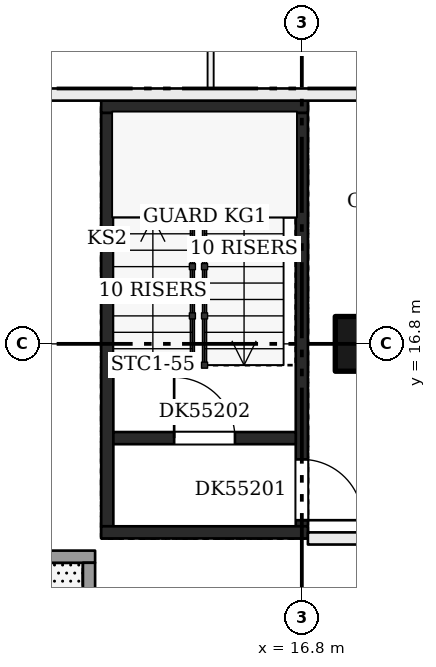
"""IFC4 building model, lengths in metres.
Left out: names, types, materials, properties, quantities, classifications, styles, units other than length and angle.
Written with IfcOpenShell. Run it as: python <this file> out.ifc"""

import sys

from ifc_helpers import new_model, si_unit, direction, frame, frame_2d, origin, origin_2d, place, context, subcontext, project, spatial, rectangle, extrude, element, fill, save


model = new_model("IFC4")
c1 = context("Model", 3, precision=1e-05, world=origin(), true_north=direction((0.0, 1.0)))
c2 = subcontext(c1, "Body", "Model", "MODEL_VIEW")
j1 = project(units=[si_unit("LENGTHUNIT", "METRE"), si_unit("PLANEANGLEUNIT", "RADIAN")], contexts=[c1])
p1 = place(None, origin())
s1 = spatial("IfcSite", under=j1, at=p1, CompositionType="ELEMENT")
p2 = place(p1, origin())
s2 = spatial("IfcBuilding", under=s1, at=p2, CompositionType="ELEMENT")
p3 = place(p2, frame((0.0, 0.0, 214.2)))
s3 = spatial("IfcBuildingStorey", under=s2, at=p3, CompositionType="ELEMENT", Elevation=214.2)
p4 = place(p3, frame((17.8, 16.8, 0.0), z_axis=(0.0, 0.0, 1.0), x_axis=(1.0, 0.0, 0.0)))
e1 = element("IfcColumn", 1, at=p4, inside=s3, PredefinedType="COLUMN", context=c2, shape_type="SweptSolid", body=[
    extrude(rectangle(XDim=0.9, YDim=0.9, at=origin_2d()), origin(), (0.0, 0.0, 1.0), 3.22),
])
p5 = place(p3, frame((13.6, 13.8, 0.0), z_axis=(0.0, 0.0, 1.0), x_axis=(0.0, 1.0, 0.0)))
e2 = element("IfcWall", 2, at=p5, inside=s3, PredefinedType="SHEAR", context=c2, shape_type="SweptSolid", body=[
    extrude(rectangle(XDim=6.8, YDim=0.2, at=frame_2d((3.4, 0.0))), origin(), (0.0, 0.0, 1.0), 3.22),
])
p6 = place(p3, frame((16.8, 13.8, 0.0), z_axis=(0.0, 0.0, 1.0), x_axis=(0.0, 1.0, 0.0)))
e3 = element("IfcWall", 3, at=p6, inside=s3, PredefinedType="SHEAR", context=c2, shape_type="SweptSolid", body=[
    extrude(rectangle(XDim=6.8, YDim=0.2, at=frame_2d((3.4, 0.0))), origin(), (0.0, 0.0, 1.0), 3.22),
])
p7 = place(p6, frame((0.1, 0.0, 0.0)))
e4 = element("IfcOpeningElement", 4, at=p7, cuts=e3, PredefinedType="OPENING", context=c2, shape_type="SweptSolid", body=[
    extrude(rectangle(XDim=1.0, YDim=2.1, at=frame_2d((0.5, 1.05))), frame((0.0, 0.11, 0.0), z_axis=(0.0, -1.0, 0.0), x_axis=(1.0, 0.0, 0.0)), (0.0, 0.0, 1.0), 0.22),
])
for number, where, z_axis, x_axis in (
    (5, (13.5, 13.7, 0.0), (0.0, 0.0, 1.0), (1.0, 0.0, 0.0)),
    (6, (13.5, 20.7, 0.0), (0.0, 0.0, 1.0), (1.0, 0.0, 0.0)),
):
    element("IfcWall", number, at=place(p3, frame(where, z_axis=z_axis, x_axis=x_axis)), inside=s3, PredefinedType="SHEAR", context=c2, shape_type="SweptSolid", body=[
        extrude(rectangle(XDim=3.4, YDim=0.2, at=frame_2d((1.7, 0.0))), origin(), (0.0, 0.0, 1.0), 3.22),
    ])
p8 = place(p3, frame((13.7, 15.25, 0.0), z_axis=(0.0, 0.0, 1.0), x_axis=(1.0, 0.0, 0.0)))
e7 = element("IfcWall", 7, at=p8, inside=s3, PredefinedType="SHEAR", context=c2, shape_type="SweptSolid", body=[
    extrude(rectangle(XDim=3.0, YDim=0.2, at=frame_2d((1.5, 0.0))), origin(), (0.0, 0.0, 1.0), 3.22),
])
p9 = place(p8, frame((1.0, 0.0, 0.0)))
e8 = element("IfcOpeningElement", 8, at=p9, cuts=e7, PredefinedType="OPENING", context=c2, shape_type="SweptSolid", body=[
    extrude(rectangle(XDim=1.0, YDim=2.1, at=frame_2d((0.5, 1.05))), frame((0.0, 0.11, 0.0), z_axis=(0.0, -1.0, 0.0), x_axis=(1.0, 0.0, 0.0)), (0.0, 0.0, 1.0), 0.22),
])
p10 = place(p3, frame((16.9, 13.6, 0.0), z_axis=(0.0, 0.0, 1.0), x_axis=(1.0, 0.0, 0.0)))
e9 = element("IfcWall", 9, at=p10, inside=s3, PredefinedType="PARTITIONING", context=c2, shape_type="SweptSolid", body=[
    extrude(rectangle(XDim=4.2, YDim=0.2, at=frame_2d((2.1, 0.0))), origin(), (0.0, 0.0, 1.0), 3.22),
])
p11 = place(p10, frame((1.6, 0.0, 0.0)))
e10 = element("IfcOpeningElement", 10, at=p11, cuts=e9, PredefinedType="OPENING", context=c2, shape_type="SweptSolid", body=[
    extrude(rectangle(XDim=1.0, YDim=2.1, at=frame_2d((0.5, 1.05))), frame((0.0, 0.11, 0.0), z_axis=(0.0, -1.0, 0.0), x_axis=(1.0, 0.0, 0.0)), (0.0, 0.0, 1.0), 0.22),
])
p12 = place(p3, frame((10.9, 20.9, 0.0), z_axis=(0.0, 0.0, 1.0), x_axis=(1.0, 0.0, 0.0)))
e11 = element("IfcWall", 11, at=p12, inside=s3, PredefinedType="PARTITIONING", context=c2, shape_type="SweptSolid", body=[
    extrude(rectangle(XDim=8.3, YDim=0.2, at=frame_2d((4.15, 0.0))), origin(), (0.0, 0.0, 1.0), 3.22),
])
p13 = place(p3, frame((15.3, 21.0, 0.0), z_axis=(0.0, 0.0, 1.0), x_axis=(0.0, 1.0, 0.0)))
e12 = element("IfcWall", 12, at=p13, inside=s3, PredefinedType="PARTITIONING", context=c2, shape_type="SweptSolid", body=[
    extrude(rectangle(XDim=19.0, YDim=0.1, at=frame_2d((9.5, 0.0))), origin(), (0.0, 0.0, 1.0), 3.22),
])
p14 = place(p13, frame((1.6, 0.0, 0.0)))
e13 = element("IfcOpeningElement", 13, at=p14, cuts=e12, PredefinedType="OPENING", context=c2, shape_type="SweptSolid", body=[
    extrude(rectangle(XDim=0.9, YDim=2.1, at=frame_2d((0.45, 1.05))), frame((0.0, 0.06, 0.0), z_axis=(0.0, -1.0, 0.0), x_axis=(1.0, 0.0, 0.0)), (0.0, 0.0, 1.0), 0.12),
])
p15 = place(p13, frame((5.8, 0.0, 0.0)))
e14 = element("IfcOpeningElement", 14, at=p15, cuts=e12, PredefinedType="OPENING", context=c2, shape_type="SweptSolid", body=[
    extrude(rectangle(XDim=0.9, YDim=2.1, at=frame_2d((0.45, 1.05))), frame((0.0, 0.06, 0.0), z_axis=(0.0, -1.0, 0.0), x_axis=(1.0, 0.0, 0.0)), (0.0, 0.0, 1.0), 0.12),
])
p16 = place(p13, frame((10.0, 0.0, 0.0)))
e15 = element("IfcOpeningElement", 15, at=p16, cuts=e12, PredefinedType="OPENING", context=c2, shape_type="SweptSolid", body=[
    extrude(rectangle(XDim=0.9, YDim=2.1, at=frame_2d((0.45, 1.05))), frame((0.0, 0.06, 0.0), z_axis=(0.0, -1.0, 0.0), x_axis=(1.0, 0.0, 0.0)), (0.0, 0.0, 1.0), 0.12),
])
p17 = place(p13, frame((15.4, 0.0, 0.0)))
e16 = element("IfcOpeningElement", 16, at=p17, cuts=e12, PredefinedType="OPENING", context=c2, shape_type="SweptSolid", body=[
    extrude(rectangle(XDim=0.9, YDim=2.1, at=frame_2d((0.45, 1.05))), frame((0.0, 0.06, 0.0), z_axis=(0.0, -1.0, 0.0), x_axis=(1.0, 0.0, 0.0)), (0.0, 0.0, 1.0), 0.12),
])
p18 = place(p3, frame((10.8, 13.3, 0.0), z_axis=(0.0, 0.0, 1.0), x_axis=(1.0, 0.0, 0.0)))
e17 = element("IfcWall", 17, at=p18, inside=s3, PredefinedType="SOLIDWALL", context=c2, shape_type="SweptSolid", body=[
    extrude(rectangle(XDim=2.6, YDim=0.2, at=frame_2d((1.3, 0.0))), origin(), (0.0, 0.0, 1.0), 3.22),
])
p19 = place(p3, frame((13.3, 13.2, 0.0), z_axis=(0.0, 0.0, 1.0), x_axis=(0.0, -1.0, 0.0)))
e18 = element("IfcWall", 18, at=p19, inside=s3, PredefinedType="SOLIDWALL", context=c2, shape_type="SweptSolid", body=[
    extrude(rectangle(XDim=2.2, YDim=0.2, at=frame_2d((1.1, 0.0))), origin(), (0.0, 0.0, 1.0), 3.22),
])
p20 = place(p7, frame((1.0, 0.0, 0.0), z_axis=(0.0, 0.0, 1.0), x_axis=(-1.0, 0.0, 0.0)))
e19 = element("IfcDoor", 19, at=p20, inside=s3, OperationType="SINGLE_SWING_RIGHT", PredefinedType="DOOR", context=c2, shape_type="SweptSolid", body=[
    extrude(rectangle(XDim=1.0, YDim=2.1, at=frame_2d((0.5, 1.05))), frame((0.0, 0.025, 0.0), z_axis=(0.0, -1.0, 0.0), x_axis=(1.0, 0.0, 0.0)), (0.0, 0.0, 1.0), 0.05),
])
fill(e4, e19)
p21 = place(p9, origin())
e20 = element("IfcDoor", 20, at=p21, inside=s3, OperationType="SINGLE_SWING_LEFT", PredefinedType="DOOR", context=c2, shape_type="SweptSolid", body=[
    extrude(rectangle(XDim=1.0, YDim=2.1, at=frame_2d((0.5, 1.05))), frame((0.0, 0.025, 0.0), z_axis=(0.0, -1.0, 0.0), x_axis=(1.0, 0.0, 0.0)), (0.0, 0.0, 1.0), 0.05),
])
fill(e8, e20)
save(model, sys.argv[1])
